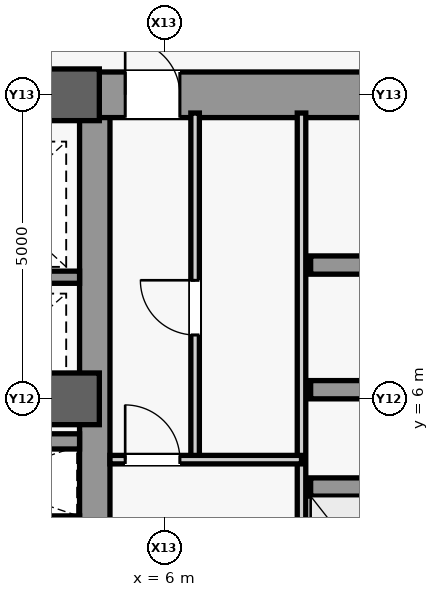
"""IFC4 building model, lengths in metres.
Left out: names, types, materials, properties, quantities, classifications, styles, units other than length and angle.
Written with IfcOpenShell. Run it as: python <this file> out.ifc"""

import sys

from ifc_helpers import new_model, si_unit, direction, frame, frame_2d, origin, origin_2d, place, context, subcontext, project, spatial, rectangle, extrude, source, transform, mapped, element, fill, save


model = new_model("IFC4")
c1 = context("Model", 3, precision=1e-05, world=origin(), true_north=direction((0.0, 1.0)))
c2 = subcontext(c1, "Body", "Model", "MODEL_VIEW")
j1 = project(units=[si_unit("LENGTHUNIT", "METRE"), si_unit("PLANEANGLEUNIT", "RADIAN")], contexts=[c1])
p1 = place(None, origin())
s1 = spatial("IfcSite", under=j1, at=p1, CompositionType="ELEMENT")
p2 = place(p1, origin())
s2 = spatial("IfcBuilding", under=s1, at=p2, CompositionType="ELEMENT")
p3 = place(p2, frame((0.0, 0.0, 149.9)))
s3 = spatial("IfcBuildingStorey", under=s2, at=p3, CompositionType="ELEMENT", Elevation=149.9)
m1 = source(origin(), c2, "Body", "SweptSolid", [
    extrude(rectangle(XDim=21.4, YDim=0.5, at=frame_2d((10.7, 0.0))), origin(), (0.0, 0.0, 1.0), 4.98),
])
p4 = place(p3, frame((4.85, -10.7, 0.0), z_axis=(0.0, 0.0, 1.0), x_axis=(0.0, 1.0, 0.0)))
e1 = element("IfcWall", 1, at=p4, inside=s3, PredefinedType="SHEAR", context=c2, shape_type="MappedRepresentation", body=[
    mapped(m1, transform((0.0, 0.0, 0.0), scale=1.0)),
])
m2 = source(origin(), c2, "Body", "SweptSolid", [
    extrude(rectangle(XDim=5.85, YDim=0.75, at=frame_2d((2.925, 0.0))), origin(), (0.0, 0.0, 1.0), 4.98),
])
p5 = place(p3, frame((4.85, 11.0, 0.0), z_axis=(0.0, 0.0, 1.0), x_axis=(1.0, 0.0, 0.0)))
e2 = element("IfcWall", 2, at=p5, inside=s3, PredefinedType="SHEAR", context=c2, shape_type="MappedRepresentation", body=[
    mapped(m2, transform((0.0, 0.0, 0.0), scale=1.0)),
])
m3 = source(origin(), c2, "Body", "SweptSolid", [
    extrude(rectangle(XDim=0.9, YDim=2.15, at=frame_2d((0.45, 1.075))), frame((0.0, 0.385, 0.0), z_axis=(0.0, -1.0, 0.0), x_axis=(1.0, 0.0, 0.0)), (0.0, 0.0, 1.0), 0.77),
])
p6 = place(p5, frame((0.5, 0.0, 0.0)))
e3 = element("IfcOpeningElement", 3, at=p6, cuts=e2, PredefinedType="OPENING", context=c2, shape_type="MappedRepresentation", body=[
    mapped(m3, transform((0.0, 0.0, 0.0), scale=1.0)),
])
m4 = source(origin(), c2, "Body", "SweptSolid", [
    extrude(rectangle(XDim=9.2, YDim=0.5, at=frame_2d((4.6, 0.0))), origin(), (0.0, 0.0, 1.0), 4.98),
])
p7 = place(p3, frame((-4.6, 11.0, 0.0), z_axis=(0.0, 0.0, 1.0), x_axis=(1.0, 0.0, 0.0)))
e4 = element("IfcWall", 4, at=p7, inside=s3, PredefinedType="SHEAR", context=c2, shape_type="MappedRepresentation", body=[
    mapped(m4, transform((0.0, 0.0, 0.0), scale=1.0)),
])
m5 = source(origin(), c2, "Body", "SweptSolid", [
    extrude(rectangle(XDim=1.8, YDim=2.25, at=frame_2d((0.9, 1.125))), frame((0.0, 0.26, 0.0), z_axis=(0.0, -1.0, 0.0), x_axis=(1.0, 0.0, 0.0)), (0.0, 0.0, 1.0), 0.52),
])
p8 = place(p7, frame((3.7, 0.0, 0.0)))
e5 = element("IfcOpeningElement", 5, at=p8, cuts=e4, PredefinedType="OPENING", context=c2, shape_type="MappedRepresentation", body=[
    mapped(m5, transform((0.0, 0.0, 0.0), scale=1.0)),
])
m6 = source(origin(), c2, "Body", "SweptSolid", [
    extrude(rectangle(XDim=0.85, YDim=0.85, at=origin_2d()), origin(), (0.0, 0.0, 1.0), 5.2),
])
for number, where, z_axis, x_axis in (
    (6, (4.5, 6.0, 0.0), (0.0, 0.0, 1.0), (1.0, 0.0, 0.0)),
    (7, (4.5, 11.0, 0.0), (0.0, 0.0, 1.0), (1.0, 0.0, 0.0)),
):
    element("IfcColumn", number, at=place(p3, frame(where, z_axis=z_axis, x_axis=x_axis)), inside=s3, PredefinedType="COLUMN", context=c2, shape_type="MappedRepresentation", body=[
        mapped(m6, transform((0.0, 0.0, 0.0), scale=1.0)),
    ])
m7 = source(origin(), c2, "Body", "SweptSolid", [
    extrude(rectangle(XDim=2.3, YDim=0.3, at=frame_2d((1.15, 0.0))), origin(), (0.0, 0.0, 1.0), 4.98),
])
for number, where, z_axis, x_axis in (
    (8, (8.4, 4.55, 0.0), (0.0, 0.0, 1.0), (1.0, 0.0, 0.0)),
    (9, (8.4, 6.15, 0.0), (0.0, 0.0, 1.0), (1.0, 0.0, 0.0)),
    (10, (8.4, 8.2, 0.0), (0.0, 0.0, 1.0), (1.0, 0.0, 0.0)),
):
    element("IfcWall", number, at=place(p3, frame(where, z_axis=z_axis, x_axis=x_axis)), inside=s3, PredefinedType="SHEAR", context=c2, shape_type="MappedRepresentation", body=[
        mapped(m7, transform((0.0, 0.0, 0.0), scale=1.0)),
    ])
m8 = source(origin(), c2, "Body", "SweptSolid", [
    extrude(rectangle(XDim=9.4, YDim=0.14, at=frame_2d((4.7, 0.0))), origin(), (0.0, 0.0, 1.0), 4.98),
])
p9 = place(p3, frame((8.25, 1.3, 0.0), z_axis=(0.0, 0.0, 1.0), x_axis=(0.0, 1.0, 0.0)))
e11 = element("IfcWall", 11, at=p9, inside=s3, PredefinedType="PARTITIONING", context=c2, shape_type="MappedRepresentation", body=[
    mapped(m8, transform((0.0, 0.0, 0.0), scale=1.0)),
])
m9 = source(origin(), c2, "Body", "SweptSolid", [
    extrude(rectangle(XDim=5.7, YDim=0.14, at=frame_2d((2.85, 0.0))), origin(), (0.0, 0.0, 1.0), 4.98),
])
p10 = place(p3, frame((6.5, 5.0, 0.0), z_axis=(0.0, 0.0, 1.0), x_axis=(0.0, 1.0, 0.0)))
e12 = element("IfcWall", 12, at=p10, inside=s3, PredefinedType="PARTITIONING", context=c2, shape_type="MappedRepresentation", body=[
    mapped(m9, transform((0.0, 0.0, 0.0), scale=1.0)),
])
m10 = source(origin(), c2, "Body", "SweptSolid", [
    extrude(rectangle(XDim=0.9, YDim=2.15, at=frame_2d((0.45, 1.075))), frame((0.0, 0.08, 0.0), z_axis=(0.0, -1.0, 0.0), x_axis=(1.0, 0.0, 0.0)), (0.0, 0.0, 1.0), 0.16),
])
p11 = place(p10, frame((2.05, 0.0, 0.0)))
e13 = element("IfcOpeningElement", 13, at=p11, cuts=e12, PredefinedType="OPENING", context=c2, shape_type="MappedRepresentation", body=[
    mapped(m10, transform((0.0, 0.0, 0.0), scale=1.0)),
])
m11 = source(origin(), c2, "Body", "SweptSolid", [
    extrude(rectangle(XDim=3.15, YDim=0.14, at=frame_2d((1.575, 0.0))), origin(), (0.0, 0.0, 1.0), 4.98),
])
p12 = place(p3, frame((5.1, 5.0, 0.0), z_axis=(0.0, 0.0, 1.0), x_axis=(1.0, 0.0, 0.0)))
e14 = element("IfcWall", 14, at=p12, inside=s3, PredefinedType="PARTITIONING", context=c2, shape_type="MappedRepresentation", body=[
    mapped(m11, transform((0.0, 0.0, 0.0), scale=1.0)),
])
p13 = place(p12, frame((0.25, 0.0, 0.0)))
e15 = element("IfcOpeningElement", 15, at=p13, cuts=e14, PredefinedType="OPENING", context=c2, shape_type="MappedRepresentation", body=[
    mapped(m10, transform((0.0, 0.0, 0.0), scale=1.0)),
])
m12 = source(origin(), c2, "Body", "SweptSolid", [
    extrude(rectangle(XDim=3.45, YDim=0.15, at=frame_2d((1.725, 0.0))), origin(), (0.0, 0.0, 1.0), 4.98),
])
p14 = place(p3, frame((1.15, 4.0, 0.0), z_axis=(0.0, 0.0, 1.0), x_axis=(1.0, 0.0, 0.0)))
e16 = element("IfcWall", 16, at=p14, inside=s3, PredefinedType="PARTITIONING", context=c2, shape_type="MappedRepresentation", body=[
    mapped(m12, transform((0.0, 0.0, 0.0), scale=1.0)),
])
m13 = source(origin(), c2, "Body", "SweptSolid", [
    extrude(rectangle(XDim=2.45, YDim=0.2, at=frame_2d((1.225, 0.0))), origin(), (0.0, 0.0, 1.0), 4.98),
])
p15 = place(p3, frame((2.15, 8.0, 0.0), z_axis=(0.0, 0.0, 1.0), x_axis=(1.0, 0.0, 0.0)))
e17 = element("IfcWall", 17, at=p15, inside=s3, PredefinedType="SHEAR", context=c2, shape_type="MappedRepresentation", body=[
    mapped(m13, transform((0.0, 0.0, 0.0), scale=1.0)),
])
m14 = source(origin(), c2, "Body", "SweptSolid", [
    extrude(rectangle(XDim=9.2, YDim=0.25, at=frame_2d((4.6, 0.0))), origin(), (0.0, 0.0, 1.0), 4.98),
])
p16 = place(p3, frame((-4.6, 5.3, 0.0), z_axis=(0.0, 0.0, 1.0), x_axis=(1.0, 0.0, 0.0)))
e18 = element("IfcWall", 18, at=p16, inside=s3, PredefinedType="SHEAR", context=c2, shape_type="MappedRepresentation", body=[
    mapped(m14, transform((0.0, 0.0, 0.0), scale=1.0)),
])
m15 = source(origin(), c2, "Body", "SweptSolid", [
    extrude(rectangle(XDim=1.05, YDim=2.2, at=frame_2d((0.525, 1.1))), frame((0.0, 0.135, 0.0), z_axis=(0.0, -1.0, 0.0), x_axis=(1.0, 0.0, 0.0)), (0.0, 0.0, 1.0), 0.27),
])
p17 = place(p16, frame((4.075, 0.0, 0.0)))
e19 = element("IfcOpeningElement", 19, at=p17, cuts=e18, PredefinedType="OPENING", context=c2, shape_type="MappedRepresentation", body=[
    mapped(m15, transform((0.0, 0.0, 0.0), scale=1.0)),
])
m16 = source(origin(), c2, "Body", "SweptSolid", [
    extrude(rectangle(XDim=0.9, YDim=2.15, at=frame_2d((0.45, 1.075))), frame((0.0, 0.025, 0.0), z_axis=(0.0, -1.0, 0.0), x_axis=(1.0, 0.0, 0.0)), (0.0, 0.0, 1.0), 0.05),
])
p18 = place(p6, origin())
e20 = element("IfcDoor", 20, at=p18, inside=s3, OperationType="SINGLE_SWING_LEFT", PredefinedType="DOOR", context=c2, shape_type="MappedRepresentation", body=[
    mapped(m16, transform((0.0, 0.0, 0.0), scale=1.0)),
])
fill(e3, e20)
p19 = place(p11, origin())
e21 = element("IfcDoor", 21, at=p19, inside=s3, OperationType="SINGLE_SWING_RIGHT", PredefinedType="DOOR", context=c2, shape_type="MappedRepresentation", body=[
    mapped(m16, transform((0.0, 0.0, 0.0), scale=1.0)),
])
fill(e13, e21)
p20 = place(p13, origin())
e22 = element("IfcDoor", 22, at=p20, inside=s3, OperationType="SINGLE_SWING_LEFT", PredefinedType="DOOR", context=c2, shape_type="MappedRepresentation", body=[
    mapped(m16, transform((0.0, 0.0, 0.0), scale=1.0)),
])
fill(e15, e22)
save(model, sys.argv[1])
